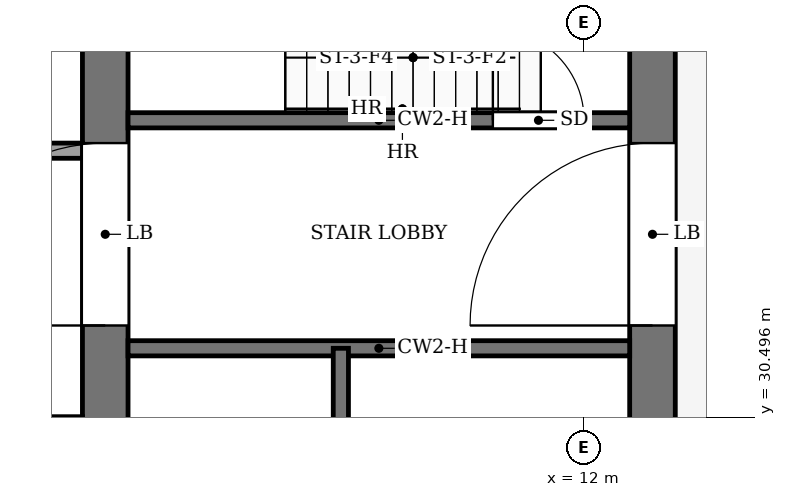
"""IFC4 building model, lengths in metres.
Left out: names, types, materials, properties, quantities, classifications, styles, units other than length and angle.
Written with IfcOpenShell. Run it as: python <this file> out.ifc"""

import sys

from ifc_helpers import new_model, si_unit, direction, frame, frame_2d, origin, place, context, subcontext, project, spatial, rectangle, extrude, element, fill, save


model = new_model("IFC4")
c1 = context("Model", 3, precision=1e-05, world=origin(), true_north=direction((0.0, 1.0)))
c2 = subcontext(c1, "Body", "Model", "MODEL_VIEW")
j1 = project(units=[si_unit("LENGTHUNIT", "METRE"), si_unit("PLANEANGLEUNIT", "RADIAN")], contexts=[c1])
p1 = place(None, origin())
s1 = spatial("IfcSite", under=j1, at=p1, CompositionType="ELEMENT")
p2 = place(p1, origin())
s2 = spatial("IfcBuilding", under=s1, at=p2, CompositionType="ELEMENT")
p3 = place(p2, frame((0.0, 0.0, 340.5)))
s3 = spatial("IfcBuildingStorey", under=s2, at=p3, CompositionType="ELEMENT", Elevation=340.5)
p4 = place(p3, frame((12.9, 18.4, -0.15), z_axis=(0.0, 0.0, 1.0), x_axis=(0.0, 1.0, 0.0)))
e1 = element("IfcWall", 1, at=p4, inside=s3, PredefinedType="SHEAR", context=c2, shape_type="SweptSolid", body=[
    extrude(rectangle(XDim=19.2, YDim=0.6, at=frame_2d((9.6, 0.0))), origin(), (0.0, 0.0, 1.0), 9.0),
])
p5 = place(p4, frame((2.8, 0.0, 0.15)))
e2 = element("IfcOpeningElement", 2, at=p5, cuts=e1, PredefinedType="OPENING", context=c2, shape_type="SweptSolid", body=[
    extrude(rectangle(XDim=2.4, YDim=2.4, at=frame_2d((1.2, 1.2))), frame((0.0, 0.31, 0.0), z_axis=(0.0, -1.0, 0.0), x_axis=(1.0, 0.0, 0.0)), (0.0, 0.0, 1.0), 0.62),
])
p6 = place(p4, frame((13.3, 0.0, 0.15)))
e3 = element("IfcOpeningElement", 3, at=p6, cuts=e1, PredefinedType="OPENING", context=c2, shape_type="SweptSolid", body=[
    extrude(rectangle(XDim=2.4, YDim=2.4, at=frame_2d((1.2, 1.2))), frame((0.0, 0.31, 0.0), z_axis=(0.0, -1.0, 0.0), x_axis=(1.0, 0.0, 0.0)), (0.0, 0.0, 1.0), 0.62),
])
p7 = place(p3, frame((5.7, 18.4, -0.15), z_axis=(0.0, 0.0, 1.0), x_axis=(0.0, 1.0, 0.0)))
e4 = element("IfcWall", 4, at=p7, inside=s3, PredefinedType="SHEAR", context=c2, shape_type="SweptSolid", body=[
    extrude(rectangle(XDim=19.2, YDim=0.6, at=frame_2d((9.6, 0.0))), origin(), (0.0, 0.0, 1.0), 9.0),
])
p8 = place(p7, frame((13.3, 0.0, 0.15)))
e5 = element("IfcOpeningElement", 5, at=p8, cuts=e4, PredefinedType="OPENING", context=c2, shape_type="SweptSolid", body=[
    extrude(rectangle(XDim=2.4, YDim=2.4, at=frame_2d((1.2, 1.2))), frame((0.0, 0.31, 0.0), z_axis=(0.0, -1.0, 0.0), x_axis=(1.0, 0.0, 0.0)), (0.0, 0.0, 1.0), 0.62),
])
p9 = place(p3, frame((6.0, 31.4, 0.0), z_axis=(0.0, 0.0, 1.0), x_axis=(1.0, 0.0, 0.0)))
e6 = element("IfcWall", 6, at=p9, inside=s3, PredefinedType="PARTITIONING", context=c2, shape_type="SweptSolid", body=[
    extrude(rectangle(XDim=6.6, YDim=0.2, at=frame_2d((3.3, 0.0))), origin(), (0.0, 0.0, 1.0), 8.85),
])
p10 = place(p3, frame((-5.4, 34.0, 0.0), z_axis=(0.0, 0.0, 1.0), x_axis=(1.0, 0.0, 0.0)))
e7 = element("IfcWall", 7, at=p10, inside=s3, PredefinedType="PARTITIONING", context=c2, shape_type="SweptSolid", body=[
    extrude(rectangle(XDim=10.8, YDim=0.2, at=frame_2d((5.4, 0.0))), origin(), (0.0, 0.0, 1.0), 8.85),
])
p11 = place(p10, frame((8.95, 0.0, 0.0)))
e8 = element("IfcOpeningElement", 8, at=p11, cuts=e7, PredefinedType="OPENING", context=c2, shape_type="SweptSolid", body=[
    extrude(rectangle(XDim=1.0, YDim=2.1, at=frame_2d((0.5, 1.05))), frame((0.0, 0.11, 0.0), z_axis=(0.0, -1.0, 0.0), x_axis=(1.0, 0.0, 0.0)), (0.0, 0.0, 1.0), 0.22),
])
p12 = place(p3, frame((6.0, 34.4, 0.0), z_axis=(0.0, 0.0, 1.0), x_axis=(1.0, 0.0, 0.0)))
e9 = element("IfcWall", 9, at=p12, inside=s3, PredefinedType="PARTITIONING", context=c2, shape_type="SweptSolid", body=[
    extrude(rectangle(XDim=6.6, YDim=0.2, at=frame_2d((3.3, 0.0))), origin(), (0.0, 0.0, 1.0), 8.85),
])
p13 = place(p12, frame((4.8, 0.0, 0.0)))
e10 = element("IfcOpeningElement", 10, at=p13, cuts=e9, PredefinedType="OPENING", context=c2, shape_type="SweptSolid", body=[
    extrude(rectangle(XDim=1.2, YDim=2.2, at=frame_2d((0.6, 1.1))), frame((0.0, 0.11, 0.0), z_axis=(0.0, -1.0, 0.0), x_axis=(1.0, 0.0, 0.0)), (0.0, 0.0, 1.0), 0.22),
])
p14 = place(p3, frame((8.8, 24.0, 0.0), z_axis=(0.0, 0.0, 1.0), x_axis=(0.0, 1.0, 0.0)))
e11 = element("IfcWall", 11, at=p14, inside=s3, PredefinedType="PARTITIONING", context=c2, shape_type="SweptSolid", body=[
    extrude(rectangle(XDim=7.4, YDim=0.2, at=frame_2d((3.7, 0.0))), origin(), (0.0, 0.0, 1.0), 8.85),
])
p15 = place(p13, origin())
e12 = element("IfcDoor", 12, at=p15, inside=s3, OperationType="SINGLE_SWING_LEFT", PredefinedType="DOOR", context=c2, shape_type="SweptSolid", body=[
    extrude(rectangle(XDim=1.2, YDim=2.2, at=frame_2d((0.6, 1.1))), frame((0.0, 0.025, 0.0), z_axis=(0.0, -1.0, 0.0), x_axis=(1.0, 0.0, 0.0)), (0.0, 0.0, 1.0), 0.05),
])
fill(e10, e12)
p16 = place(p8, origin())
e13 = element("IfcDoor", 13, at=p16, inside=s3, OperationType="DOUBLE_DOOR_SINGLE_SWING", PredefinedType="DOOR", context=c2, shape_type="SweptSolid", body=[
    extrude(rectangle(XDim=2.4, YDim=2.4, at=frame_2d((1.2, 1.2))), frame((0.0, 0.025, 0.0), z_axis=(0.0, -1.0, 0.0), x_axis=(1.0, 0.0, 0.0)), (0.0, 0.0, 1.0), 0.05),
])
fill(e5, e13)
p17 = place(p6, origin())
e14 = element("IfcDoor", 14, at=p17, inside=s3, OperationType="DOUBLE_DOOR_SINGLE_SWING", PredefinedType="DOOR", context=c2, shape_type="SweptSolid", body=[
    extrude(rectangle(XDim=2.4, YDim=2.4, at=frame_2d((1.2, 1.2))), frame((0.0, 0.025, 0.0), z_axis=(0.0, -1.0, 0.0), x_axis=(1.0, 0.0, 0.0)), (0.0, 0.0, 1.0), 0.05),
])
fill(e3, e14)
save(model, sys.argv[1])
